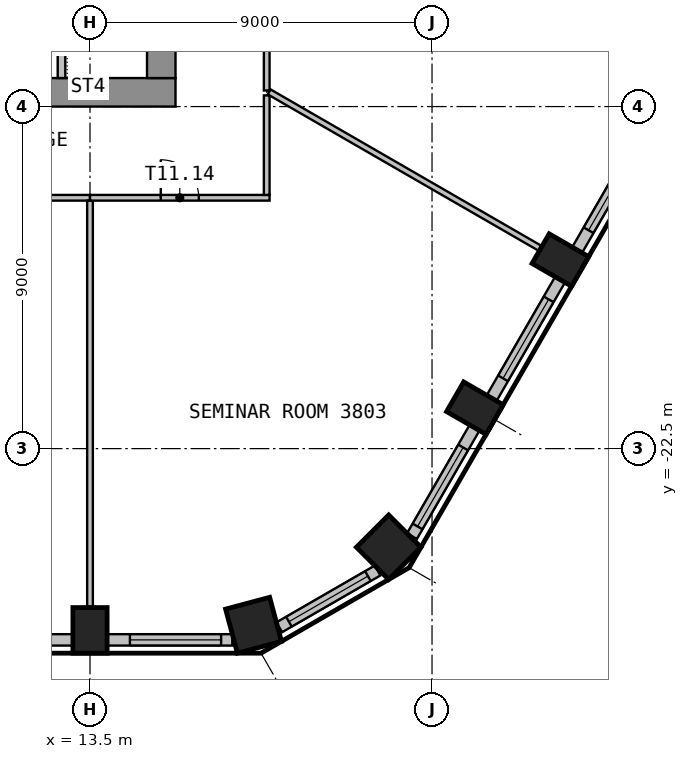
"""IFC4 building model, lengths in metres.
Left out: names, types, materials, properties, quantities, classifications, styles, units other than length and angle.
Written with IfcOpenShell. Run it as: python <this file> out.ifc"""

import sys

from ifc_helpers import new_model, si_unit, direction, frame, frame_2d, origin, origin_2d, place, context, subcontext, project, spatial, rectangle, extrude, element, fill, save


model = new_model("IFC4")
c1 = context("Model", 3, precision=1e-05, world=origin(), true_north=direction((0.0, 1.0)))
c2 = subcontext(c1, "Body", "Model", "MODEL_VIEW")
j1 = project(units=[si_unit("LENGTHUNIT", "METRE"), si_unit("PLANEANGLEUNIT", "RADIAN")], contexts=[c1])
p1 = place(None, origin())
s1 = spatial("IfcSite", under=j1, at=p1, CompositionType="ELEMENT")
p2 = place(p1, origin())
s2 = spatial("IfcBuilding", under=s1, at=p2, CompositionType="ELEMENT")
p3 = place(p2, frame((0.0, 0.0, 156.0)))
s3 = spatial("IfcBuildingStorey", under=s2, at=p3, CompositionType="ELEMENT", Elevation=156.0)
p4 = place(p3, frame((13.5, -27.283, 0.0), z_axis=(0.0, 0.0, 1.0), x_axis=(1.0, 0.0, 0.0)))
e1 = element("IfcColumn", 1, at=p4, inside=s3, PredefinedType="COLUMN", context=c2, shape_type="SweptSolid", body=[
    extrude(rectangle(XDim=0.9, YDim=1.2, at=origin_2d()), origin(), (0.0, 0.0, 1.0), 3.575),
])
for number, where, z_axis, x_axis in (
    (2, (17.803, -27.148, 0.0), (0.0, 0.0, 1.0), (0.966, 0.259, 0.0)),
    (3, (21.359, -25.095, 0.0), (0.0, 0.0, 1.0), (0.707, 0.707, 0.0)),
):
    element("IfcColumn", number, at=place(p3, frame(where, z_axis=z_axis, x_axis=x_axis)), inside=s3, PredefinedType="COLUMN", context=c2, shape_type="SweptSolid", body=[
        extrude(rectangle(XDim=1.2, YDim=1.2, at=origin_2d()), origin(), (0.0, 0.0, 1.0), 3.575),
    ])
for number, where, z_axis, x_axis in (
    (4, (23.627, -21.436, 0.0), (0.0, 0.0, 1.0), (0.5, 0.866, 0.0)),
    (5, (25.877, -17.539, 0.0), (0.0, 0.0, 1.0), (0.5, 0.866, 0.0)),
):
    element("IfcColumn", number, at=place(p3, frame(where, z_axis=z_axis, x_axis=x_axis)), inside=s3, PredefinedType="COLUMN", context=c2, shape_type="SweptSolid", body=[
        extrude(rectangle(XDim=0.9, YDim=1.2, at=origin_2d()), origin(), (0.0, 0.0, 1.0), 3.575),
    ])
p5 = place(p3, frame((9.45, -27.533, 0.0), z_axis=(0.0, 0.0, 1.0), x_axis=(1.0, 0.0, 0.0)))
e6 = element("IfcWall", 6, at=p5, inside=s3, PredefinedType="SOLIDWALL", context=c2, shape_type="SweptSolid", body=[
    extrude(rectangle(XDim=3.599, YDim=0.3, at=frame_2d((1.8, 0.0))), origin(), (0.0, 0.0, 1.0), 3.575),
])
p6 = place(p5, frame((0.6, 0.0, 0.9)))
e7 = element("IfcOpeningElement", 7, at=p6, cuts=e6, PredefinedType="OPENING", context=c2, shape_type="SweptSolid", body=[
    extrude(rectangle(XDim=2.4, YDim=2.1, at=frame_2d((1.2, 1.05))), frame((0.0, 0.16, 0.0), z_axis=(0.0, -1.0, 0.0), x_axis=(1.0, 0.0, 0.0)), (0.0, 0.0, 1.0), 0.32),
])
p7 = place(p3, frame((13.95, -27.533, 0.0), z_axis=(0.0, 0.0, 1.0), x_axis=(1.0, 0.0, 0.0)))
e8 = element("IfcWall", 8, at=p7, inside=s3, PredefinedType="SOLIDWALL", context=c2, shape_type="SweptSolid", body=[
    extrude(rectangle(XDim=3.294, YDim=0.3, at=frame_2d((1.647, 0.0))), origin(), (0.0, 0.0, 1.0), 3.575),
])
p8 = place(p7, frame((0.6, 0.0, 0.9)))
e9 = element("IfcOpeningElement", 9, at=p8, cuts=e8, PredefinedType="OPENING", context=c2, shape_type="SweptSolid", body=[
    extrude(rectangle(XDim=2.4, YDim=2.1, at=frame_2d((1.2, 1.05))), frame((0.0, 0.16, 0.0), z_axis=(0.0, -1.0, 0.0), x_axis=(1.0, 0.0, 0.0)), (0.0, 0.0, 1.0), 0.32),
])
p9 = place(p3, frame((18.479, -27.202, 0.0), z_axis=(0.0, 0.0, 1.0), x_axis=(0.866012844897, 0.500021752, 0.0)))
e10 = element("IfcWall", 10, at=p9, inside=s3, PredefinedType="SOLIDWALL", context=c2, shape_type="SweptSolid", body=[
    extrude(rectangle(XDim=2.989, YDim=0.3, at=frame_2d((1.495, 0.0))), origin(), (0.0, 0.0, 1.0), 3.575),
])
p10 = place(p9, frame((0.295, 0.0, 0.9)))
e11 = element("IfcOpeningElement", 11, at=p10, cuts=e10, PredefinedType="OPENING", context=c2, shape_type="SweptSolid", body=[
    extrude(rectangle(XDim=2.4, YDim=2.1, at=frame_2d((1.2, 1.05))), frame((0.0, 0.16, 0.0), z_axis=(0.0, -1.0, 0.0), x_axis=(1.0, 0.0, 0.0)), (0.0, 0.0, 1.0), 0.32),
])
p11 = place(p3, frame((21.972, -24.803, 0.0), z_axis=(0.0, 0.0, 1.0), x_axis=(0.500036802197, 0.866004154983, 0.0)))
e12 = element("IfcWall", 12, at=p11, inside=s3, PredefinedType="SOLIDWALL", context=c2, shape_type="SweptSolid", body=[
    extrude(rectangle(XDim=3.294, YDim=0.3, at=frame_2d((1.647, 0.0))), origin(), (0.0, 0.0, 1.0), 3.575),
])
p12 = place(p11, frame((0.294, 0.0, 0.9)))
e13 = element("IfcOpeningElement", 13, at=p12, cuts=e12, PredefinedType="OPENING", context=c2, shape_type="SweptSolid", body=[
    extrude(rectangle(XDim=2.4, YDim=2.1, at=frame_2d((1.2, 1.05))), frame((0.0, 0.16, 0.0), z_axis=(0.0, -1.0, 0.0), x_axis=(1.0, 0.0, 0.0)), (0.0, 0.0, 1.0), 0.32),
])
p13 = place(p3, frame((24.069, -21.17, 0.0), z_axis=(0.0, 0.0, 1.0), x_axis=(0.500027802648, 0.866009351323, 0.0)))
e14 = element("IfcWall", 14, at=p13, inside=s3, PredefinedType="SOLIDWALL", context=c2, shape_type="SweptSolid", body=[
    extrude(rectangle(XDim=3.599, YDim=0.3, at=frame_2d((1.799, 0.0))), origin(), (0.0, 0.0, 1.0), 3.575),
])
p14 = place(p13, frame((0.6, 0.0, 0.9)))
e15 = element("IfcOpeningElement", 15, at=p14, cuts=e14, PredefinedType="OPENING", context=c2, shape_type="SweptSolid", body=[
    extrude(rectangle(XDim=2.4, YDim=2.1, at=frame_2d((1.2, 1.05))), frame((0.0, 0.16, 0.0), z_axis=(0.0, -1.0, 0.0), x_axis=(1.0, 0.0, 0.0)), (0.0, 0.0, 1.0), 0.32),
])
p15 = place(p3, frame((26.319, -17.273, 0.0), z_axis=(0.0, 0.0, 1.0), x_axis=(0.500027802648, 0.866009351323, 0.0)))
e16 = element("IfcWall", 16, at=p15, inside=s3, PredefinedType="SOLIDWALL", context=c2, shape_type="SweptSolid", body=[
    extrude(rectangle(XDim=3.599, YDim=0.3, at=frame_2d((1.799, 0.0))), origin(), (0.0, 0.0, 1.0), 3.575),
])
p16 = place(p15, frame((0.6, 0.0, 0.9)))
e17 = element("IfcOpeningElement", 17, at=p16, cuts=e16, PredefinedType="OPENING", context=c2, shape_type="SweptSolid", body=[
    extrude(rectangle(XDim=2.4, YDim=2.1, at=frame_2d((1.2, 1.05))), frame((0.0, 0.16, 0.0), z_axis=(0.0, -1.0, 0.0), x_axis=(1.0, 0.0, 0.0)), (0.0, 0.0, 1.0), 0.32),
])
p17 = place(p3, frame((-15.75, -13.125, 0.0), z_axis=(0.0, 0.0, 1.0), x_axis=(1.0, 0.0, 0.0)))
e18 = element("IfcWall", 18, at=p17, inside=s3, PredefinedType="SHEAR", context=c2, shape_type="SweptSolid", body=[
    extrude(rectangle(XDim=31.5, YDim=0.75, at=frame_2d((15.75, 0.0))), origin(), (0.0, 0.0, 1.0), 3.575),
])
p18 = place(p17, frame((14.55, 0.0, 0.0)))
e19 = element("IfcOpeningElement", 19, at=p18, cuts=e18, PredefinedType="OPENING", context=c2, shape_type="SweptSolid", body=[
    extrude(rectangle(XDim=2.4, YDim=2.1, at=frame_2d((1.2, 1.05))), frame((0.0, 0.385, 0.0), z_axis=(0.0, -1.0, 0.0), x_axis=(1.0, 0.0, 0.0)), (0.0, 0.0, 1.0), 0.77),
])
p19 = place(p17, frame((3.3, 0.0, 0.0)))
e20 = element("IfcOpeningElement", 20, at=p19, cuts=e18, PredefinedType="OPENING", context=c2, shape_type="SweptSolid", body=[
    extrude(rectangle(XDim=1.2, YDim=2.1, at=frame_2d((0.6, 1.05))), frame((0.0, 0.385, 0.0), z_axis=(0.0, -1.0, 0.0), x_axis=(1.0, 0.0, 0.0)), (0.0, 0.0, 1.0), 0.77),
])
p20 = place(p17, frame((27.0, 0.0, 0.0)))
e21 = element("IfcOpeningElement", 21, at=p20, cuts=e18, PredefinedType="OPENING", context=c2, shape_type="SweptSolid", body=[
    extrude(rectangle(XDim=1.2, YDim=2.1, at=frame_2d((0.6, 1.05))), frame((0.0, 0.385, 0.0), z_axis=(0.0, -1.0, 0.0), x_axis=(1.0, 0.0, 0.0)), (0.0, 0.0, 1.0), 0.77),
])
p21 = place(p3, frame((15.375, -12.75, 0.0), z_axis=(0.0, 0.0, 1.0), x_axis=(0.0, 1.0, 0.0)))
e22 = element("IfcWall", 22, at=p21, inside=s3, PredefinedType="SHEAR", context=c2, shape_type="SweptSolid", body=[
    extrude(rectangle(XDim=25.5, YDim=0.75, at=frame_2d((12.75, 0.0))), origin(), (0.0, 0.0, 1.0), 3.575),
])
p22 = place(p21, frame((11.55, 0.0, 0.0)))
e23 = element("IfcOpeningElement", 23, at=p22, cuts=e22, PredefinedType="OPENING", context=c2, shape_type="SweptSolid", body=[
    extrude(rectangle(XDim=2.4, YDim=2.1, at=frame_2d((1.2, 1.05))), frame((0.0, 0.385, 0.0), z_axis=(0.0, -1.0, 0.0), x_axis=(1.0, 0.0, 0.0)), (0.0, 0.0, 1.0), 0.77),
])
p23 = place(p3, frame((12.75, -12.75, 0.0), z_axis=(0.0, 0.0, 1.0), x_axis=(0.0, 1.0, 0.0)))
e24 = element("IfcWall", 24, at=p23, inside=s3, PredefinedType="PARTITIONING", context=c2, shape_type="SweptSolid", body=[
    extrude(rectangle(XDim=1.85, YDim=0.2, at=frame_2d((0.925, 0.0))), origin(), (0.0, 0.0, 1.0), 3.575),
])
p24 = place(p3, frame((4.5, -15.9, 0.0), z_axis=(0.0, 0.0, 1.0), x_axis=(1.0, 0.0, 0.0)))
e25 = element("IfcWall", 25, at=p24, inside=s3, PredefinedType="PARTITIONING", context=c2, shape_type="SweptSolid", body=[
    extrude(rectangle(XDim=9.0, YDim=0.15, at=frame_2d((4.5, 0.0))), origin(), (0.0, 0.0, 1.0), 3.575),
])
p25 = place(p24, frame((4.0, 0.0, 0.0)))
e26 = element("IfcOpeningElement", 26, at=p25, cuts=e25, PredefinedType="OPENING", context=c2, shape_type="SweptSolid", body=[
    extrude(rectangle(XDim=1.0, YDim=2.1, at=frame_2d((0.5, 1.05))), frame((0.0, 0.085, 0.0), z_axis=(0.0, -1.0, 0.0), x_axis=(1.0, 0.0, 0.0)), (0.0, 0.0, 1.0), 0.17),
])
p26 = place(p3, frame((13.5, -15.975, 0.0), z_axis=(0.0, 0.0, 1.0), x_axis=(0.0, -1.0, 0.0)))
e27 = element("IfcWall", 27, at=p26, inside=s3, PredefinedType="MOVABLE", context=c2, shape_type="SweptSolid", body=[
    extrude(rectangle(XDim=10.688, YDim=0.15, at=frame_2d((5.344, 0.0))), origin(), (0.0, 0.0, 1.0), 3.575),
])
p27 = place(p3, frame((13.5, -15.9, 0.0), z_axis=(0.0, 0.0, 1.0), x_axis=(1.0, 0.0, 0.0)))
e28 = element("IfcWall", 28, at=p27, inside=s3, PredefinedType="PARTITIONING", context=c2, shape_type="SweptSolid", body=[
    extrude(rectangle(XDim=4.725, YDim=0.15, at=frame_2d((2.363, 0.0))), origin(), (0.0, 0.0, 1.0), 3.575),
])
p28 = place(p27, frame((1.863, 0.0, 0.0)))
e29 = element("IfcOpeningElement", 29, at=p28, cuts=e28, PredefinedType="OPENING", context=c2, shape_type="SweptSolid", body=[
    extrude(rectangle(XDim=1.0, YDim=2.1, at=frame_2d((0.5, 1.05))), frame((0.0, 0.085, 0.0), z_axis=(0.0, -1.0, 0.0), x_axis=(1.0, 0.0, 0.0)), (0.0, 0.0, 1.0), 0.17),
])
p29 = place(p3, frame((18.15, -15.825, 0.0), z_axis=(0.0, 0.0, 1.0), x_axis=(0.0, 1.0, 0.0)))
e30 = element("IfcWall", 30, at=p29, inside=s3, PredefinedType="PARTITIONING", context=c2, shape_type="SweptSolid", body=[
    extrude(rectangle(XDim=2.618, YDim=0.15, at=frame_2d((1.309, 0.0))), origin(), (0.0, 0.0, 1.0), 3.575),
])
p30 = place(p3, frame((18.15, -13.077, 0.0), z_axis=(0.0, 0.0, 1.0), x_axis=(0.0, 1.0, 0.0)))
e31 = element("IfcWall", 31, at=p30, inside=s3, PredefinedType="PARTITIONING", context=c2, shape_type="SweptSolid", body=[
    extrude(rectangle(XDim=10.902, YDim=0.15, at=frame_2d((5.451, 0.0))), origin(), (0.0, 0.0, 1.0), 3.575),
])
p31 = place(p3, frame((18.215, -13.115, 0.0), z_axis=(0.0, 0.0, 1.0), x_axis=(0.866039823271, -0.499975023885, 0.0)))
e32 = element("IfcWall", 32, at=p31, inside=s3, PredefinedType="PARTITIONING", context=c2, shape_type="SweptSolid", body=[
    extrude(rectangle(XDim=8.228, YDim=0.15, at=frame_2d((4.114, 0.0))), origin(), (0.0, 0.0, 1.0), 3.575),
])
p32 = place(p8, origin())
e33 = element("IfcWindow", 33, at=p32, inside=s3, PartitioningType="SINGLE_PANEL", PredefinedType="WINDOW", context=c2, shape_type="SweptSolid", body=[
    extrude(rectangle(XDim=2.4, YDim=2.1, at=frame_2d((1.2, 1.05))), frame((0.0, 0.03, 0.0), z_axis=(0.0, -1.0, 0.0), x_axis=(1.0, 0.0, 0.0)), (0.0, 0.0, 1.0), 0.06),
])
fill(e9, e33)
p33 = place(p10, origin())
e34 = element("IfcWindow", 34, at=p33, inside=s3, PartitioningType="SINGLE_PANEL", PredefinedType="WINDOW", context=c2, shape_type="SweptSolid", body=[
    extrude(rectangle(XDim=2.4, YDim=2.1, at=frame_2d((1.2, 1.05))), frame((0.0, 0.03, 0.0), z_axis=(0.0, -1.0, 0.0), x_axis=(1.0, 0.0, 0.0)), (0.0, 0.0, 1.0), 0.06),
])
fill(e11, e34)
p34 = place(p12, origin())
e35 = element("IfcWindow", 35, at=p34, inside=s3, PartitioningType="SINGLE_PANEL", PredefinedType="WINDOW", context=c2, shape_type="SweptSolid", body=[
    extrude(rectangle(XDim=2.4, YDim=2.1, at=frame_2d((1.2, 1.05))), frame((0.0, 0.03, 0.0), z_axis=(0.0, -1.0, 0.0), x_axis=(1.0, 0.0, 0.0)), (0.0, 0.0, 1.0), 0.06),
])
fill(e13, e35)
p35 = place(p14, origin())
e36 = element("IfcWindow", 36, at=p35, inside=s3, PartitioningType="SINGLE_PANEL", PredefinedType="WINDOW", context=c2, shape_type="SweptSolid", body=[
    extrude(rectangle(XDim=2.4, YDim=2.1, at=frame_2d((1.2, 1.05))), frame((0.0, 0.03, 0.0), z_axis=(0.0, -1.0, 0.0), x_axis=(1.0, 0.0, 0.0)), (0.0, 0.0, 1.0), 0.06),
])
fill(e15, e36)
p36 = place(p16, origin())
e37 = element("IfcWindow", 37, at=p36, inside=s3, PartitioningType="SINGLE_PANEL", PredefinedType="WINDOW", context=c2, shape_type="SweptSolid", body=[
    extrude(rectangle(XDim=2.4, YDim=2.1, at=frame_2d((1.2, 1.05))), frame((0.0, 0.03, 0.0), z_axis=(0.0, -1.0, 0.0), x_axis=(1.0, 0.0, 0.0)), (0.0, 0.0, 1.0), 0.06),
])
fill(e17, e37)
p37 = place(p28, origin())
e38 = element("IfcDoor", 38, at=p37, inside=s3, OperationType="SINGLE_SWING_LEFT", PredefinedType="DOOR", context=c2, shape_type="SweptSolid", body=[
    extrude(rectangle(XDim=1.0, YDim=2.1, at=frame_2d((0.5, 1.05))), frame((0.0, 0.025, 0.0), z_axis=(0.0, -1.0, 0.0), x_axis=(1.0, 0.0, 0.0)), (0.0, 0.0, 1.0), 0.05),
])
fill(e29, e38)
save(model, sys.argv[1])
